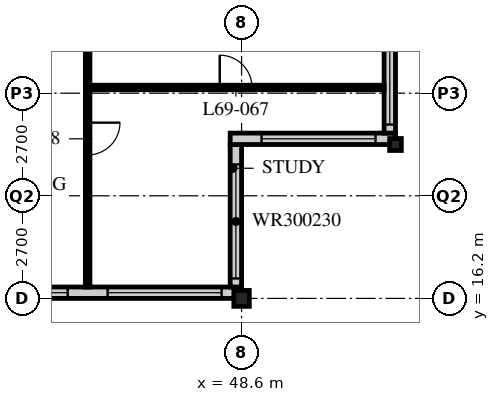
"""IFC4 building model, lengths in metres.
Left out: names, types, materials, properties, quantities, classifications, styles, units other than length and angle.
Written with IfcOpenShell. Run it as: python <this file> out.ifc"""

import sys

from ifc_helpers import new_model, si_unit, direction, frame, frame_2d, origin, origin_2d, place, context, subcontext, project, spatial, rectangle, i_section, extrude, element, fill, save


model = new_model("IFC4")
c1 = context("Model", 3, precision=1e-05, world=origin(), true_north=direction((0.0, 1.0)))
c2 = subcontext(c1, "Body", "Model", "MODEL_VIEW")
j1 = project(units=[si_unit("LENGTHUNIT", "METRE"), si_unit("PLANEANGLEUNIT", "RADIAN")], contexts=[c1])
p1 = place(None, origin())
s1 = spatial("IfcSite", under=j1, at=p1, CompositionType="ELEMENT")
p2 = place(p1, origin())
s2 = spatial("IfcBuilding", under=s1, at=p2, CompositionType="ELEMENT")
p3 = place(p2, frame((0.0, 0.0, 269.7)))
s3 = spatial("IfcBuildingStorey", under=s2, at=p3, CompositionType="ELEMENT", Elevation=269.7)
p4 = place(p3, frame((48.6, 16.2, 0.0), z_axis=(0.0, 0.0, 1.0), x_axis=(1.0, 0.0, 0.0)))
e1 = element("IfcColumn", 1, at=p4, inside=s3, PredefinedType="COLUMN", context=c2, shape_type="SweptSolid", body=[
    extrude(i_section(OverallWidth=0.407, OverallDepth=0.419, WebThickness=0.031, FlangeThickness=0.049, FilletRadius=0.015, at=origin_2d()), origin(), (0.0, 0.0, 1.0), 3.9),
])
p5 = place(p3, frame((52.65, 20.25, 0.0), z_axis=(0.0, 0.0, 1.0), x_axis=(1.0, 0.0, 0.0)))
e2 = element("IfcColumn", 2, at=p5, inside=s3, PredefinedType="COLUMN", context=c2, shape_type="SweptSolid", body=[
    extrude(i_section(OverallWidth=0.307, OverallDepth=0.314, WebThickness=0.012, FlangeThickness=0.019, FilletRadius=0.015, at=origin_2d()), origin(), (0.0, 0.0, 1.0), 3.9),
])
p6 = place(p3, frame((8.4, 16.35, 0.0), z_axis=(0.0, 0.0, 1.0), x_axis=(1.0, 0.0, 0.0)))
e3 = element("IfcWall", 3, at=p6, inside=s3, PredefinedType="SOLIDWALL", context=c2, shape_type="SweptSolid", body=[
    extrude(rectangle(XDim=40.2, YDim=0.3, at=frame_2d((20.1, 0.0))), origin(), (0.0, 0.0, 1.0), 3.69),
])
p7 = place(p6, frame((0.225, 0.0, 0.6)))
e4 = element("IfcOpeningElement", 4, at=p7, cuts=e3, PredefinedType="OPENING", context=c2, shape_type="SweptSolid", body=[
    extrude(rectangle(XDim=3.0, YDim=2.4, at=frame_2d((1.5, 1.2))), frame((0.0, 0.16, 0.0), z_axis=(0.0, -1.0, 0.0), x_axis=(1.0, 0.0, 0.0)), (0.0, 0.0, 1.0), 0.32),
])
p8 = place(p6, frame((4.275, 0.0, 0.6)))
e5 = element("IfcOpeningElement", 5, at=p8, cuts=e3, PredefinedType="OPENING", context=c2, shape_type="SweptSolid", body=[
    extrude(rectangle(XDim=3.0, YDim=2.4, at=frame_2d((1.5, 1.2))), frame((0.0, 0.16, 0.0), z_axis=(0.0, -1.0, 0.0), x_axis=(1.0, 0.0, 0.0)), (0.0, 0.0, 1.0), 0.32),
])
p9 = place(p6, frame((8.325, 0.0, 0.6)))
e6 = element("IfcOpeningElement", 6, at=p9, cuts=e3, PredefinedType="OPENING", context=c2, shape_type="SweptSolid", body=[
    extrude(rectangle(XDim=3.0, YDim=2.4, at=frame_2d((1.5, 1.2))), frame((0.0, 0.16, 0.0), z_axis=(0.0, -1.0, 0.0), x_axis=(1.0, 0.0, 0.0)), (0.0, 0.0, 1.0), 0.32),
])
p10 = place(p6, frame((12.375, 0.0, 0.6)))
e7 = element("IfcOpeningElement", 7, at=p10, cuts=e3, PredefinedType="OPENING", context=c2, shape_type="SweptSolid", body=[
    extrude(rectangle(XDim=3.0, YDim=2.4, at=frame_2d((1.5, 1.2))), frame((0.0, 0.16, 0.0), z_axis=(0.0, -1.0, 0.0), x_axis=(1.0, 0.0, 0.0)), (0.0, 0.0, 1.0), 0.32),
])
p11 = place(p6, frame((16.425, 0.0, 0.6)))
e8 = element("IfcOpeningElement", 8, at=p11, cuts=e3, PredefinedType="OPENING", context=c2, shape_type="SweptSolid", body=[
    extrude(rectangle(XDim=3.0, YDim=2.4, at=frame_2d((1.5, 1.2))), frame((0.0, 0.16, 0.0), z_axis=(0.0, -1.0, 0.0), x_axis=(1.0, 0.0, 0.0)), (0.0, 0.0, 1.0), 0.32),
])
p12 = place(p6, frame((20.475, 0.0, 0.6)))
e9 = element("IfcOpeningElement", 9, at=p12, cuts=e3, PredefinedType="OPENING", context=c2, shape_type="SweptSolid", body=[
    extrude(rectangle(XDim=3.0, YDim=2.4, at=frame_2d((1.5, 1.2))), frame((0.0, 0.16, 0.0), z_axis=(0.0, -1.0, 0.0), x_axis=(1.0, 0.0, 0.0)), (0.0, 0.0, 1.0), 0.32),
])
p13 = place(p6, frame((24.525, 0.0, 0.6)))
e10 = element("IfcOpeningElement", 10, at=p13, cuts=e3, PredefinedType="OPENING", context=c2, shape_type="SweptSolid", body=[
    extrude(rectangle(XDim=3.0, YDim=2.4, at=frame_2d((1.5, 1.2))), frame((0.0, 0.16, 0.0), z_axis=(0.0, -1.0, 0.0), x_axis=(1.0, 0.0, 0.0)), (0.0, 0.0, 1.0), 0.32),
])
p14 = place(p6, frame((28.575, 0.0, 0.6)))
e11 = element("IfcOpeningElement", 11, at=p14, cuts=e3, PredefinedType="OPENING", context=c2, shape_type="SweptSolid", body=[
    extrude(rectangle(XDim=3.0, YDim=2.4, at=frame_2d((1.5, 1.2))), frame((0.0, 0.16, 0.0), z_axis=(0.0, -1.0, 0.0), x_axis=(1.0, 0.0, 0.0)), (0.0, 0.0, 1.0), 0.32),
])
p15 = place(p6, frame((32.625, 0.0, 0.6)))
e12 = element("IfcOpeningElement", 12, at=p15, cuts=e3, PredefinedType="OPENING", context=c2, shape_type="SweptSolid", body=[
    extrude(rectangle(XDim=3.0, YDim=2.4, at=frame_2d((1.5, 1.2))), frame((0.0, 0.16, 0.0), z_axis=(0.0, -1.0, 0.0), x_axis=(1.0, 0.0, 0.0)), (0.0, 0.0, 1.0), 0.32),
])
p16 = place(p6, frame((36.675, 0.0, 0.6)))
e13 = element("IfcOpeningElement", 13, at=p16, cuts=e3, PredefinedType="OPENING", context=c2, shape_type="SweptSolid", body=[
    extrude(rectangle(XDim=3.0, YDim=2.4, at=frame_2d((1.5, 1.2))), frame((0.0, 0.16, 0.0), z_axis=(0.0, -1.0, 0.0), x_axis=(1.0, 0.0, 0.0)), (0.0, 0.0, 1.0), 0.32),
])
p17 = place(p3, frame((48.45, 16.5, 0.0), z_axis=(0.0, 0.0, 1.0), x_axis=(0.0, 1.0, 0.0)))
e14 = element("IfcWall", 14, at=p17, inside=s3, PredefinedType="SOLIDWALL", context=c2, shape_type="SweptSolid", body=[
    extrude(rectangle(XDim=3.75, YDim=0.3, at=frame_2d((1.875, 0.0))), origin(), (0.0, 0.0, 1.0), 3.69),
])
p18 = place(p17, frame((0.225, 0.0, 0.6)))
e15 = element("IfcOpeningElement", 15, at=p18, cuts=e14, PredefinedType="OPENING", context=c2, shape_type="SweptSolid", body=[
    extrude(rectangle(XDim=3.0, YDim=2.3, at=frame_2d((1.5, 1.15))), frame((0.0, 0.16, 0.0), z_axis=(0.0, -1.0, 0.0), x_axis=(1.0, 0.0, 0.0)), (0.0, 0.0, 1.0), 0.32),
])
p19 = place(p3, frame((48.3, 20.4, 0.0), z_axis=(0.0, 0.0, 1.0), x_axis=(1.0, 0.0, 0.0)))
e16 = element("IfcWall", 16, at=p19, inside=s3, PredefinedType="SOLIDWALL", context=c2, shape_type="SweptSolid", body=[
    extrude(rectangle(XDim=4.35, YDim=0.3, at=frame_2d((2.175, 0.0))), origin(), (0.0, 0.0, 1.0), 3.69),
])
p20 = place(p19, frame((0.825, 0.0, 0.6)))
e17 = element("IfcOpeningElement", 17, at=p20, cuts=e16, PredefinedType="OPENING", context=c2, shape_type="SweptSolid", body=[
    extrude(rectangle(XDim=3.0, YDim=2.3, at=frame_2d((1.5, 1.15))), frame((0.0, 0.16, 0.0), z_axis=(0.0, -1.0, 0.0), x_axis=(1.0, 0.0, 0.0)), (0.0, 0.0, 1.0), 0.32),
])
p21 = place(p3, frame((52.5, 20.55, 0.0), z_axis=(0.0, 0.0, 1.0), x_axis=(0.0, 1.0, 0.0)))
e18 = element("IfcWall", 18, at=p21, inside=s3, PredefinedType="SOLIDWALL", context=c2, shape_type="SweptSolid", body=[
    extrude(rectangle(XDim=3.75, YDim=0.3, at=frame_2d((1.875, 0.0))), origin(), (0.0, 0.0, 1.0), 3.69),
])
p22 = place(p21, frame((0.225, 0.0, 0.6)))
e19 = element("IfcOpeningElement", 19, at=p22, cuts=e18, PredefinedType="OPENING", context=c2, shape_type="SweptSolid", body=[
    extrude(rectangle(XDim=3.0, YDim=2.3, at=frame_2d((1.5, 1.15))), frame((0.0, 0.16, 0.0), z_axis=(0.0, -1.0, 0.0), x_axis=(1.0, 0.0, 0.0)), (0.0, 0.0, 1.0), 0.32),
])
p23 = place(p3, frame((44.55, 16.5, 0.0), z_axis=(0.0, 0.0, 1.0), x_axis=(0.0, 1.0, 0.0)))
e20 = element("IfcWall", 20, at=p23, inside=s3, PredefinedType="PARTITIONING", context=c2, shape_type="SweptSolid", body=[
    extrude(rectangle(XDim=7.8, YDim=0.12, at=frame_2d((3.9, 0.0))), origin(), (0.0, 0.0, 1.0), 3.69),
])
p24 = place(p23, frame((3.475, 0.0, 0.0)))
e21 = element("IfcOpeningElement", 21, at=p24, cuts=e20, PredefinedType="OPENING", context=c2, shape_type="SweptSolid", body=[
    extrude(rectangle(XDim=0.85, YDim=2.1, at=frame_2d((0.425, 1.05))), frame((0.0, 0.07, 0.0), z_axis=(0.0, -1.0, 0.0), x_axis=(1.0, 0.0, 0.0)), (0.0, 0.0, 1.0), 0.14),
])
p25 = place(p3, frame((44.55, 21.75, 0.0), z_axis=(0.0, 0.0, 1.0), x_axis=(1.0, 0.0, 0.0)))
e22 = element("IfcWall", 22, at=p25, inside=s3, PredefinedType="PARTITIONING", context=c2, shape_type="SweptSolid", body=[
    extrude(rectangle(XDim=7.8, YDim=0.12, at=frame_2d((3.9, 0.0))), origin(), (0.0, 0.0, 1.0), 3.69),
])
p26 = place(p25, frame((3.475, 0.0, 0.0)))
e23 = element("IfcOpeningElement", 23, at=p26, cuts=e22, PredefinedType="OPENING", context=c2, shape_type="SweptSolid", body=[
    extrude(rectangle(XDim=0.85, YDim=2.1, at=frame_2d((0.425, 1.05))), frame((0.0, 0.07, 0.0), z_axis=(0.0, -1.0, 0.0), x_axis=(1.0, 0.0, 0.0)), (0.0, 0.0, 1.0), 0.14),
])
p27 = place(p15, origin())
e24 = element("IfcWindow", 24, at=p27, inside=s3, PartitioningType="SINGLE_PANEL", PredefinedType="WINDOW", context=c2, shape_type="SweptSolid", body=[
    extrude(rectangle(XDim=3.0, YDim=2.4, at=frame_2d((1.5, 1.2))), frame((0.0, 0.03, 0.0), z_axis=(0.0, -1.0, 0.0), x_axis=(1.0, 0.0, 0.0)), (0.0, 0.0, 1.0), 0.06),
])
fill(e12, e24)
p28 = place(p16, origin())
e25 = element("IfcWindow", 25, at=p28, inside=s3, PartitioningType="SINGLE_PANEL", PredefinedType="WINDOW", context=c2, shape_type="SweptSolid", body=[
    extrude(rectangle(XDim=3.0, YDim=2.4, at=frame_2d((1.5, 1.2))), frame((0.0, 0.03, 0.0), z_axis=(0.0, -1.0, 0.0), x_axis=(1.0, 0.0, 0.0)), (0.0, 0.0, 1.0), 0.06),
])
fill(e13, e25)
p29 = place(p18, origin())
e26 = element("IfcWindow", 26, at=p29, inside=s3, PartitioningType="SINGLE_PANEL", PredefinedType="WINDOW", context=c2, shape_type="SweptSolid", body=[
    extrude(rectangle(XDim=3.0, YDim=2.3, at=frame_2d((1.5, 1.15))), frame((0.0, 0.03, 0.0), z_axis=(0.0, -1.0, 0.0), x_axis=(1.0, 0.0, 0.0)), (0.0, 0.0, 1.0), 0.06),
])
fill(e15, e26)
p30 = place(p20, origin())
e27 = element("IfcWindow", 27, at=p30, inside=s3, PartitioningType="SINGLE_PANEL", PredefinedType="WINDOW", context=c2, shape_type="SweptSolid", body=[
    extrude(rectangle(XDim=3.0, YDim=2.3, at=frame_2d((1.5, 1.15))), frame((0.0, 0.03, 0.0), z_axis=(0.0, -1.0, 0.0), x_axis=(1.0, 0.0, 0.0)), (0.0, 0.0, 1.0), 0.06),
])
fill(e17, e27)
p31 = place(p22, origin())
e28 = element("IfcWindow", 28, at=p31, inside=s3, PartitioningType="SINGLE_PANEL", PredefinedType="WINDOW", context=c2, shape_type="SweptSolid", body=[
    extrude(rectangle(XDim=3.0, YDim=2.3, at=frame_2d((1.5, 1.15))), frame((0.0, 0.03, 0.0), z_axis=(0.0, -1.0, 0.0), x_axis=(1.0, 0.0, 0.0)), (0.0, 0.0, 1.0), 0.06),
])
fill(e19, e28)
p32 = place(p24, origin())
e29 = element("IfcDoor", 29, at=p32, inside=s3, OperationType="SINGLE_SWING_LEFT", PredefinedType="DOOR", context=c2, shape_type="SweptSolid", body=[
    extrude(rectangle(XDim=0.85, YDim=2.1, at=frame_2d((0.425, 1.05))), frame((0.0, 0.025, 0.0), z_axis=(0.0, -1.0, 0.0), x_axis=(1.0, 0.0, 0.0)), (0.0, 0.0, 1.0), 0.05),
])
fill(e21, e29)
p33 = place(p26, origin())
e30 = element("IfcDoor", 30, at=p33, inside=s3, OperationType="SINGLE_SWING_LEFT", PredefinedType="DOOR", context=c2, shape_type="SweptSolid", body=[
    extrude(rectangle(XDim=0.85, YDim=2.1, at=frame_2d((0.425, 1.05))), frame((0.0, 0.025, 0.0), z_axis=(0.0, -1.0, 0.0), x_axis=(1.0, 0.0, 0.0)), (0.0, 0.0, 1.0), 0.05),
])
fill(e23, e30)
save(model, sys.argv[1])
